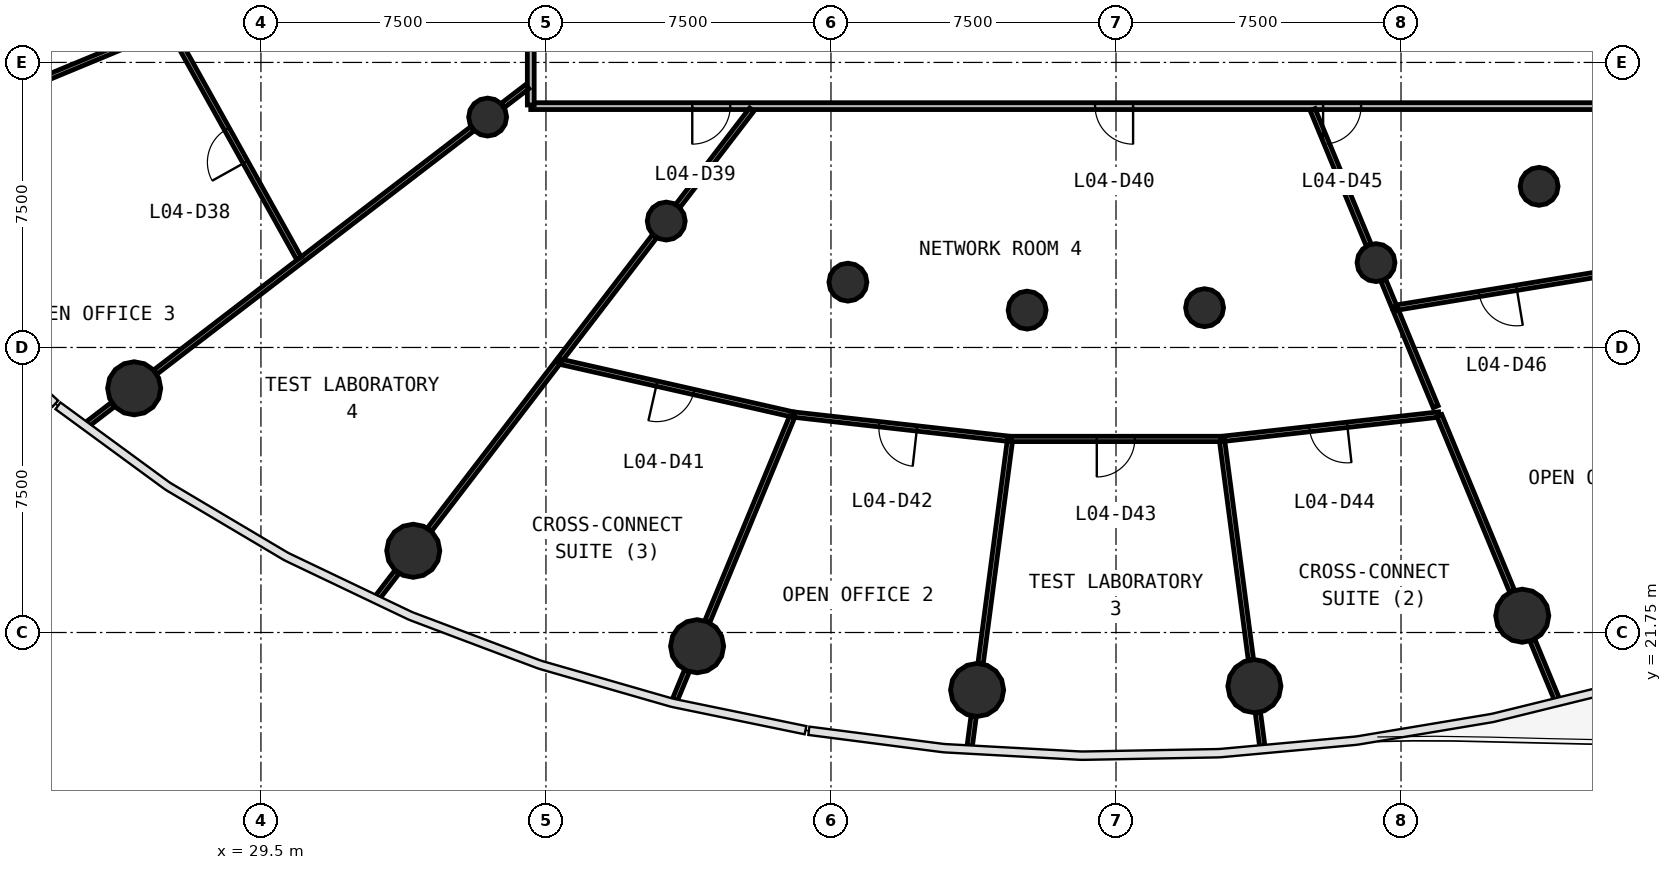
"""IFC4 building model, lengths in metres.
Left out: names, types, materials, properties, quantities, classifications, styles, units other than length and angle.
Written with IfcOpenShell. Run it as: python <this file> out.ifc"""

import sys

from ifc_helpers import new_model, si_unit, direction, frame, frame_2d, origin, origin_2d, place, context, subcontext, project, spatial, rectangle, circle, extrude, source, transform, mapped, element, fill, save


model = new_model("IFC4")
c1 = context("Model", 3, precision=1e-05, world=origin(), true_north=direction((0.0, 1.0)))
c2 = subcontext(c1, "Body", "Model", "MODEL_VIEW")
j1 = project(units=[si_unit("LENGTHUNIT", "METRE"), si_unit("PLANEANGLEUNIT", "RADIAN")], contexts=[c1])
p1 = place(None, origin())
s1 = spatial("IfcSite", under=j1, at=p1, CompositionType="ELEMENT")
p2 = place(p1, origin())
s2 = spatial("IfcBuilding", under=s1, at=p2, CompositionType="ELEMENT")
p3 = place(p2, frame((0.0, 0.0, 18.2)))
s3 = spatial("IfcBuildingStorey", under=s2, at=p3, CompositionType="ELEMENT", Elevation=18.2)
m1 = source(origin(), c2, "Body", "SweptSolid", [
    extrude(circle(Radius=0.7, at=origin_2d()), origin(), (0.0, 0.0, 1.0), 4.4),
])
for number, where, z_axis, x_axis in (
    (1, (26.164, 28.176, 0.0), (0.0, 0.0, 1.0), (1.0, 0.0, 0.0)),
    (2, (33.508, 23.9, 0.0), (0.0, 0.0, 1.0), (1.0, 0.0, 0.0)),
    (3, (40.977, 21.389, 0.0), (0.0, 0.0, 1.0), (1.0, 0.0, 0.0)),
    (4, (48.345, 20.239, 0.0), (0.0, 0.0, 1.0), (1.0, 0.0, 0.0)),
    (5, (55.642, 20.339, 0.0), (0.0, 0.0, 1.0), (1.0, 0.0, 0.0)),
    (6, (62.69, 22.191, 0.0), (0.0, 0.0, 1.0), (1.0, 0.0, 0.0)),
):
    element("IfcColumn", number, at=place(p3, frame(where, z_axis=z_axis, x_axis=x_axis)), inside=s3, PredefinedType="COLUMN", context=c2, shape_type="MappedRepresentation", body=[
        mapped(m1, transform((0.0, 0.0, 0.0), scale=1.0)),
    ])
m2 = source(origin(), c2, "Body", "SweptSolid", [
    extrude(circle(Radius=0.5, at=origin_2d()), origin(), (0.0, 0.0, 1.0), 4.4),
])
for number, where, z_axis, x_axis in (
    (7, (35.465, 35.312, 0.0), (0.0, 0.0, 1.0), (1.0, 0.0, 0.0)),
    (8, (40.165, 32.576, 0.0), (0.0, 0.0, 1.0), (1.0, 0.0, 0.0)),
    (9, (44.945, 30.969, 0.0), (0.0, 0.0, 1.0), (1.0, 0.0, 0.0)),
    (10, (49.661, 30.233, 0.0), (0.0, 0.0, 1.0), (1.0, 0.0, 0.0)),
    (11, (54.331, 30.297, 0.0), (0.0, 0.0, 1.0), (1.0, 0.0, 0.0)),
    (12, (58.842, 31.482, 0.0), (0.0, 0.0, 1.0), (1.0, 0.0, 0.0)),
    (13, (63.134, 33.49, 0.0), (0.0, 0.0, 1.0), (1.0, 0.0, 0.0)),
):
    element("IfcColumn", number, at=place(p3, frame(where, z_axis=z_axis, x_axis=x_axis)), inside=s3, PredefinedType="COLUMN", context=c2, shape_type="MappedRepresentation", body=[
        mapped(m2, transform((0.0, 0.0, 0.0), scale=1.0)),
    ])
p4 = place(p3, frame((67.4, 35.6, 0.0), z_axis=(0.0, 0.0, 1.0), x_axis=(-1.0, 0.0, 0.0)))
e14 = element("IfcWall", 14, at=p4, inside=s3, PredefinedType="PARTITIONING", context=c2, shape_type="SweptSolid", body=[
    extrude(rectangle(XDim=30.8, YDim=0.18, at=frame_2d((15.4, 0.0))), origin(), (0.0, 0.0, 1.0), 3.15),
])
p5 = place(p4, frame((25.55, 0.0, 0.0)))
e15 = element("IfcOpeningElement", 15, at=p5, cuts=e14, PredefinedType="OPENING", context=c2, shape_type="SweptSolid", body=[
    extrude(rectangle(XDim=1.0, YDim=2.1, at=frame_2d((0.5, 1.05))), frame((0.0, 0.1, 0.0), z_axis=(0.0, -1.0, 0.0), x_axis=(1.0, 0.0, 0.0)), (0.0, 0.0, 1.0), 0.2),
])
p6 = place(p4, frame((14.95, 0.0, 0.0)))
e16 = element("IfcOpeningElement", 16, at=p6, cuts=e14, PredefinedType="OPENING", context=c2, shape_type="SweptSolid", body=[
    extrude(rectangle(XDim=1.0, YDim=2.1, at=frame_2d((0.5, 1.05))), frame((0.0, 0.1, 0.0), z_axis=(0.0, -1.0, 0.0), x_axis=(1.0, 0.0, 0.0)), (0.0, 0.0, 1.0), 0.2),
])
p7 = place(p4, frame((8.95, 0.0, 0.0)))
e17 = element("IfcOpeningElement", 17, at=p7, cuts=e14, PredefinedType="OPENING", context=c2, shape_type="SweptSolid", body=[
    extrude(rectangle(XDim=1.0, YDim=2.1, at=frame_2d((0.5, 1.05))), frame((0.0, 0.1, 0.0), z_axis=(0.0, -1.0, 0.0), x_axis=(1.0, 0.0, 0.0)), (0.0, 0.0, 1.0), 0.2),
])
p8 = place(p3, frame((36.6, 35.63, 0.0), z_axis=(0.0, 0.0, 1.0), x_axis=(0.0, 1.0, 0.0)))
e18 = element("IfcWall", 18, at=p8, inside=s3, PredefinedType="PARTITIONING", context=c2, shape_type="SweptSolid", body=[
    extrude(rectangle(XDim=23.583, YDim=0.18, at=frame_2d((11.791, 0.0))), origin(), (0.0, 0.0, 1.0), 3.15),
])
p9 = place(p8, frame((19.133, 0.0, 0.0)))
e19 = element("IfcOpeningElement", 19, at=p9, cuts=e18, PredefinedType="OPENING", context=c2, shape_type="SweptSolid", body=[
    extrude(rectangle(XDim=1.0, YDim=2.1, at=frame_2d((0.5, 1.05))), frame((0.0, 0.1, 0.0), z_axis=(0.0, -1.0, 0.0), x_axis=(1.0, 0.0, 0.0)), (0.0, 0.0, 1.0), 0.2),
])
p10 = place(p8, frame((11.333, 0.0, 0.0)))
e20 = element("IfcOpeningElement", 20, at=p10, cuts=e18, PredefinedType="OPENING", context=c2, shape_type="SweptSolid", body=[
    extrude(rectangle(XDim=1.0, YDim=2.1, at=frame_2d((0.5, 1.05))), frame((0.0, 0.1, 0.0), z_axis=(0.0, -1.0, 0.0), x_axis=(1.0, 0.0, 0.0)), (0.0, 0.0, 1.0), 0.2),
])
p11 = place(p3, frame((26.723, 28.604, 0.0), z_axis=(0.0, 0.0, 1.0), x_axis=(0.793353660174, 0.608761012129, 0.0)))
e21 = element("IfcWall", 21, at=p11, inside=s3, PredefinedType="PARTITIONING", context=c2, shape_type="SweptSolid", body=[
    extrude(rectangle(XDim=10.515, YDim=0.14, at=frame_2d((5.257, 0.0))), origin(), (0.0, 0.0, 1.0), 3.15),
])
p12 = place(p3, frame((27.104, 37.688, 0.0), z_axis=(0.0, 0.0, 1.0), x_axis=(-0.923879422024, -0.382683699105, 0.0)))
e22 = element("IfcWall", 22, at=p12, inside=s3, PredefinedType="PARTITIONING", context=c2, shape_type="SweptSolid", body=[
    extrude(rectangle(XDim=7.254, YDim=0.14, at=frame_2d((3.627, 0.0))), origin(), (0.0, 0.0, 1.0), 3.15),
])
p13 = place(p3, frame((30.502, 31.593, 0.0), z_axis=(0.0, 0.0, 1.0), x_axis=(-0.486916265404, 0.873448653606, 0.0)))
e23 = element("IfcWall", 23, at=p13, inside=s3, PredefinedType="PARTITIONING", context=c2, shape_type="SweptSolid", body=[
    extrude(rectangle(XDim=6.948, YDim=0.14, at=frame_2d((3.474, 0.0))), origin(), (0.0, 0.0, 1.0), 3.15),
])
p14 = place(p13, frame((2.899, 0.0, 0.0)))
e24 = element("IfcOpeningElement", 24, at=p14, cuts=e23, PredefinedType="OPENING", context=c2, shape_type="SweptSolid", body=[
    extrude(rectangle(XDim=1.0, YDim=2.1, at=frame_2d((0.5, 1.05))), frame((0.0, 0.08, 0.0), z_axis=(0.0, -1.0, 0.0), x_axis=(1.0, 0.0, 0.0)), (0.0, 0.0, 1.0), 0.16),
])
p15 = place(p3, frame((43.503, 27.486, 0.0), z_axis=(0.0, 0.0, 1.0), x_axis=(-0.975258543616, 0.221067349702, 0.0)))
e25 = element("IfcWall", 25, at=p15, inside=s3, PredefinedType="PARTITIONING", context=c2, shape_type="SweptSolid", body=[
    extrude(rectangle(XDim=6.327, YDim=0.14, at=frame_2d((3.164, 0.0))), origin(), (0.0, 0.0, 1.0), 3.15),
])
p16 = place(p15, frame((2.677, 0.0, 0.0)))
e26 = element("IfcOpeningElement", 26, at=p16, cuts=e25, PredefinedType="OPENING", context=c2, shape_type="SweptSolid", body=[
    extrude(rectangle(XDim=1.0, YDim=2.1, at=frame_2d((0.5, 1.05))), frame((0.0, 0.08, 0.0), z_axis=(0.0, -1.0, 0.0), x_axis=(1.0, 0.0, 0.0)), (0.0, 0.0, 1.0), 0.16),
])
p17 = place(p3, frame((49.215, 26.843, 0.0), z_axis=(0.0, 0.0, 1.0), x_axis=(-0.130523417799, -0.991445226629, 0.0)))
e27 = element("IfcWall", 27, at=p17, inside=s3, PredefinedType="PARTITIONING", context=c2, shape_type="SweptSolid", body=[
    extrude(rectangle(XDim=5.958, YDim=0.14, at=frame_2d((2.979, 0.0))), origin(), (0.0, 0.0, 1.0), 3.15),
])
p18 = place(p3, frame((43.476, 27.42, 0.0), z_axis=(0.0, 0.0, 1.0), x_axis=(-0.382667741903, -0.923886031557, 0.0)))
e28 = element("IfcWall", 28, at=p18, inside=s3, PredefinedType="PARTITIONING", context=c2, shape_type="SweptSolid", body=[
    extrude(rectangle(XDim=5.824, YDim=0.14, at=frame_2d((2.912, 0.0))), origin(), (0.0, 0.0, 1.0), 3.15),
])
p19 = place(p3, frame((54.785, 26.843, 0.0), z_axis=(0.0, 0.0, 1.0), x_axis=(0.130522448973, -0.991445354174, 0.0)))
e29 = element("IfcWall", 29, at=p19, inside=s3, PredefinedType="PARTITIONING", context=c2, shape_type="SweptSolid", body=[
    extrude(rectangle(XDim=5.856, YDim=0.14, at=frame_2d((2.928, 0.0))), origin(), (0.0, 0.0, 1.0), 3.15),
])
p20 = place(p3, frame((49.145, 26.851, 0.0), z_axis=(0.0, 0.0, 1.0), x_axis=(-0.993732576672, 0.111783567936, 0.0)))
e30 = element("IfcWall", 30, at=p20, inside=s3, PredefinedType="PARTITIONING", context=c2, shape_type="SweptSolid", body=[
    extrude(rectangle(XDim=5.648, YDim=0.14, at=frame_2d((2.824, 0.0))), origin(), (0.0, 0.0, 1.0), 3.15),
])
p21 = place(p20, frame((2.398, 0.0, 0.0)))
e31 = element("IfcOpeningElement", 31, at=p21, cuts=e30, PredefinedType="OPENING", context=c2, shape_type="SweptSolid", body=[
    extrude(rectangle(XDim=1.0, YDim=2.1, at=frame_2d((0.5, 1.05))), frame((0.0, 0.08, 0.0), z_axis=(0.0, -1.0, 0.0), x_axis=(1.0, 0.0, 0.0)), (0.0, 0.0, 1.0), 0.16),
])
p22 = place(p3, frame((60.497, 27.486, 0.0), z_axis=(0.0, 0.0, 1.0), x_axis=(-0.993731256448, -0.111795303828, 0.0)))
e32 = element("IfcWall", 32, at=p22, inside=s3, PredefinedType="PARTITIONING", context=c2, shape_type="SweptSolid", body=[
    extrude(rectangle(XDim=5.678, YDim=0.14, at=frame_2d((2.839, 0.0))), origin(), (0.0, 0.0, 1.0), 3.15),
])
p23 = place(p22, frame((2.428, 0.0, 0.0)))
e33 = element("IfcOpeningElement", 33, at=p23, cuts=e32, PredefinedType="OPENING", context=c2, shape_type="SweptSolid", body=[
    extrude(rectangle(XDim=1.0, YDim=2.1, at=frame_2d((0.5, 1.05))), frame((0.0, 0.08, 0.0), z_axis=(0.0, -1.0, 0.0), x_axis=(1.0, 0.0, 0.0)), (0.0, 0.0, 1.0), 0.16),
])
p24 = place(p3, frame((64.857, 31.201, 0.0), z_axis=(0.0, 0.0, 1.0), x_axis=(-0.986684787107, -0.162644184928, 0.0)))
e34 = element("IfcWall", 34, at=p24, inside=s3, PredefinedType="PARTITIONING", context=c2, shape_type="SweptSolid", body=[
    extrude(rectangle(XDim=5.596, YDim=0.14, at=frame_2d((2.798, 0.0))), origin(), (0.0, 0.0, 1.0), 3.15),
])
p25 = place(p24, frame((2.346, 0.0, 0.0)))
e35 = element("IfcOpeningElement", 35, at=p25, cuts=e34, PredefinedType="OPENING", context=c2, shape_type="SweptSolid", body=[
    extrude(rectangle(XDim=1.0, YDim=2.1, at=frame_2d((0.5, 1.05))), frame((0.0, 0.08, 0.0), z_axis=(0.0, -1.0, 0.0), x_axis=(1.0, 0.0, 0.0)), (0.0, 0.0, 1.0), 0.16),
])
p26 = place(p3, frame((37.314, 28.861, 0.0), z_axis=(0.0, 0.0, 1.0), x_axis=(-0.608764043611, -0.79335133403, 0.0)))
e36 = element("IfcWall", 36, at=p26, inside=s3, PredefinedType="PARTITIONING", context=c2, shape_type="SweptSolid", body=[
    extrude(rectangle(XDim=5.548, YDim=0.14, at=frame_2d((2.774, 0.0))), origin(), (0.0, 0.0, 1.0), 3.15),
])
p27 = place(p3, frame((54.755, 26.843, 0.0), z_axis=(0.0, 0.0, 1.0), x_axis=(-1.0, 0.0, 0.0)))
e37 = element("IfcWall", 37, at=p27, inside=s3, PredefinedType="PARTITIONING", context=c2, shape_type="SweptSolid", body=[
    extrude(rectangle(XDim=5.511, YDim=0.14, at=frame_2d((2.755, 0.0))), origin(), (0.0, 0.0, 1.0), 3.15),
])
p28 = place(p27, frame((2.261, 0.0, 0.0)))
e38 = element("IfcOpeningElement", 38, at=p28, cuts=e37, PredefinedType="OPENING", context=c2, shape_type="SweptSolid", body=[
    extrude(rectangle(XDim=1.0, YDim=2.1, at=frame_2d((0.5, 1.05))), frame((0.0, 0.08, 0.0), z_axis=(0.0, -1.0, 0.0), x_axis=(1.0, 0.0, 0.0)), (0.0, 0.0, 1.0), 0.16),
])
p29 = place(p3, frame((60.509, 27.458, 0.0), z_axis=(0.0, 0.0, 1.0), x_axis=(0.382671202129, -0.923884598346, 0.0)))
e39 = element("IfcWall", 39, at=p29, inside=s3, PredefinedType="PARTITIONING", context=c2, shape_type="SweptSolid", body=[
    extrude(rectangle(XDim=4.995, YDim=0.14, at=frame_2d((2.498, 0.0))), origin(), (0.0, 0.0, 1.0), 3.15),
])
p30 = place(p3, frame((39.858, 32.176, 0.0), z_axis=(0.0, 0.0, 1.0), x_axis=(-0.608780171248, -0.793338958513, 0.0)))
e40 = element("IfcWall", 40, at=p30, inside=s3, PredefinedType="PARTITIONING", context=c2, shape_type="SweptSolid", body=[
    extrude(rectangle(XDim=4.072, YDim=0.14, at=frame_2d((2.036, 0.0))), origin(), (0.0, 0.0, 1.0), 3.15),
])
p31 = place(p3, frame((57.174, 35.51, 0.0), z_axis=(0.0, 0.0, 1.0), x_axis=(0.382644558062, -0.923895633817, 0.0)))
e41 = element("IfcWall", 41, at=p31, inside=s3, PredefinedType="PARTITIONING", context=c2, shape_type="SweptSolid", body=[
    extrude(rectangle(XDim=3.854, YDim=0.14, at=frame_2d((1.927, 0.0))), origin(), (0.0, 0.0, 1.0), 3.15),
])
p32 = place(p3, frame((42.416, 35.51, 0.0), z_axis=(0.0, 0.0, 1.0), x_axis=(-0.60874605662, -0.793365135703, 0.0)))
e42 = element("IfcWall", 42, at=p32, inside=s3, PredefinedType="PARTITIONING", context=c2, shape_type="SweptSolid", body=[
    extrude(rectangle(XDim=3.194, YDim=0.14, at=frame_2d((1.597, 0.0))), origin(), (0.0, 0.0, 1.0), 3.15),
])
p33 = place(p3, frame((59.363, 30.225, 0.0), z_axis=(0.0, 0.0, 1.0), x_axis=(0.382661079663, -0.923888790987, 0.0)))
e43 = element("IfcWall", 43, at=p33, inside=s3, PredefinedType="PARTITIONING", context=c2, shape_type="SweptSolid", body=[
    extrude(rectangle(XDim=2.742, YDim=0.14, at=frame_2d((1.371, 0.0))), origin(), (0.0, 0.0, 1.0), 3.15),
])
p34 = place(p3, frame((62.96, 21.54, 0.0), z_axis=(0.0, 0.0, 1.0), x_axis=(0.382571117301, -0.923926046936, 0.0)))
e44 = element("IfcWall", 44, at=p34, inside=s3, PredefinedType="PARTITIONING", context=c2, shape_type="SweptSolid", body=[
    extrude(rectangle(XDim=1.671, YDim=0.14, at=frame_2d((0.836, 0.0))), origin(), (0.0, 0.0, 1.0), 3.15),
])
p35 = place(p3, frame((36.51, 36.114, 0.0), z_axis=(0.0, 0.0, 1.0), x_axis=(-0.793316076519, -0.608809989025, 0.0)))
e45 = element("IfcWall", 45, at=p35, inside=s3, PredefinedType="PARTITIONING", context=c2, shape_type="SweptSolid", body=[
    extrude(rectangle(XDim=0.812, YDim=0.14, at=frame_2d((0.406, 0.0))), origin(), (0.0, 0.0, 1.0), 3.15),
])
p36 = place(p3, frame((55.734, 19.64, 0.0), z_axis=(0.0, 0.0, 1.0), x_axis=(0.130632362566, -0.991430877999, 0.0)))
e46 = element("IfcWall", 46, at=p36, inside=s3, PredefinedType="PARTITIONING", context=c2, shape_type="SweptSolid", body=[
    extrude(rectangle(XDim=0.888, YDim=0.14, at=frame_2d((0.444, 0.0))), origin(), (0.0, 0.0, 1.0), 3.15),
])
p37 = place(p3, frame((24.94, 27.236, 0.0), z_axis=(0.0, 0.0, 1.0), x_axis=(0.793423692124, 0.608669733745, 0.0)))
e47 = element("IfcWall", 47, at=p37, inside=s3, PredefinedType="PARTITIONING", context=c2, shape_type="SweptSolid", body=[
    extrude(rectangle(XDim=0.839, YDim=0.14, at=frame_2d((0.419, 0.0))), origin(), (0.0, 0.0, 1.0), 3.15),
])
p38 = place(p3, frame((33.079, 23.342, 0.0), z_axis=(0.0, 0.0, 1.0), x_axis=(-0.608939798959, -0.793216440351, 0.0)))
e48 = element("IfcWall", 48, at=p38, inside=s3, PredefinedType="PARTITIONING", context=c2, shape_type="SweptSolid", body=[
    extrude(rectangle(XDim=0.827, YDim=0.14, at=frame_2d((0.413, 0.0))), origin(), (0.0, 0.0, 1.0), 3.15),
])
p39 = place(p3, frame((40.708, 20.737, 0.0), z_axis=(0.0, 0.0, 1.0), x_axis=(-0.382692107758, -0.923875938998, 0.0)))
e49 = element("IfcWall", 49, at=p39, inside=s3, PredefinedType="PARTITIONING", context=c2, shape_type="SweptSolid", body=[
    extrude(rectangle(XDim=0.802, YDim=0.14, at=frame_2d((0.401, 0.0))), origin(), (0.0, 0.0, 1.0), 3.15),
])
p40 = place(p3, frame((48.253, 19.54, 0.0), z_axis=(0.0, 0.0, 1.0), x_axis=(-0.130639131193, -0.991429986132, 0.0)))
e50 = element("IfcWall", 50, at=p40, inside=s3, PredefinedType="PARTITIONING", context=c2, shape_type="SweptSolid", body=[
    extrude(rectangle(XDim=0.787, YDim=0.14, at=frame_2d((0.394, 0.0))), origin(), (0.0, 0.0, 1.0), 3.15),
])
p41 = place(p3, frame((59.035, 31.016, 0.0), z_axis=(0.0, 0.0, 1.0), x_axis=(0.382799508823, -0.923831443525, 0.0)))
e51 = element("IfcWall", 51, at=p41, inside=s3, PredefinedType="PARTITIONING", context=c2, shape_type="SweptSolid", body=[
    extrude(rectangle(XDim=0.754, YDim=0.14, at=frame_2d((0.377, 0.0))), origin(), (0.0, 0.0, 1.0), 3.15),
])
m3 = source(origin(), c2, "Body", "SweptSolid", [
    extrude(rectangle(XDim=1.0, YDim=2.1, at=frame_2d((0.5, 1.05))), frame((0.0, 0.025, 0.0), z_axis=(0.0, -1.0, 0.0), x_axis=(1.0, 0.0, 0.0)), (0.0, 0.0, 1.0), 0.05),
])
p42 = place(p14, origin())
e52 = element("IfcDoor", 52, at=p42, inside=s3, OperationType="SINGLE_SWING_LEFT", PredefinedType="DOOR", context=c2, shape_type="MappedRepresentation", body=[
    mapped(m3, transform((0.0, 0.0, 0.0), scale=1.0)),
])
fill(e24, e52)
p43 = place(p5, origin())
e53 = element("IfcDoor", 53, at=p43, inside=s3, OperationType="SINGLE_SWING_RIGHT", PredefinedType="DOOR", context=c2, shape_type="MappedRepresentation", body=[
    mapped(m3, transform((0.0, 0.0, 0.0), scale=1.0)),
])
fill(e15, e53)
p44 = place(p6, origin())
e54 = element("IfcDoor", 54, at=p44, inside=s3, OperationType="SINGLE_SWING_LEFT", PredefinedType="DOOR", context=c2, shape_type="MappedRepresentation", body=[
    mapped(m3, transform((0.0, 0.0, 0.0), scale=1.0)),
])
fill(e16, e54)
p45 = place(p16, origin())
e55 = element("IfcDoor", 55, at=p45, inside=s3, OperationType="SINGLE_SWING_RIGHT", PredefinedType="DOOR", context=c2, shape_type="MappedRepresentation", body=[
    mapped(m3, transform((0.0, 0.0, 0.0), scale=1.0)),
])
fill(e26, e55)
p46 = place(p21, origin())
e56 = element("IfcDoor", 56, at=p46, inside=s3, OperationType="SINGLE_SWING_LEFT", PredefinedType="DOOR", context=c2, shape_type="MappedRepresentation", body=[
    mapped(m3, transform((0.0, 0.0, 0.0), scale=1.0)),
])
fill(e31, e56)
p47 = place(p28, origin())
e57 = element("IfcDoor", 57, at=p47, inside=s3, OperationType="SINGLE_SWING_RIGHT", PredefinedType="DOOR", context=c2, shape_type="MappedRepresentation", body=[
    mapped(m3, transform((0.0, 0.0, 0.0), scale=1.0)),
])
fill(e38, e57)
p48 = place(p23, origin())
e58 = element("IfcDoor", 58, at=p48, inside=s3, OperationType="SINGLE_SWING_LEFT", PredefinedType="DOOR", context=c2, shape_type="MappedRepresentation", body=[
    mapped(m3, transform((0.0, 0.0, 0.0), scale=1.0)),
])
fill(e33, e58)
p49 = place(p7, origin())
e59 = element("IfcDoor", 59, at=p49, inside=s3, OperationType="SINGLE_SWING_RIGHT", PredefinedType="DOOR", context=c2, shape_type="MappedRepresentation", body=[
    mapped(m3, transform((0.0, 0.0, 0.0), scale=1.0)),
])
fill(e17, e59)
p50 = place(p25, origin())
e60 = element("IfcDoor", 60, at=p50, inside=s3, OperationType="SINGLE_SWING_LEFT", PredefinedType="DOOR", context=c2, shape_type="MappedRepresentation", body=[
    mapped(m3, transform((0.0, 0.0, 0.0), scale=1.0)),
])
fill(e35, e60)
save(model, sys.argv[1])
